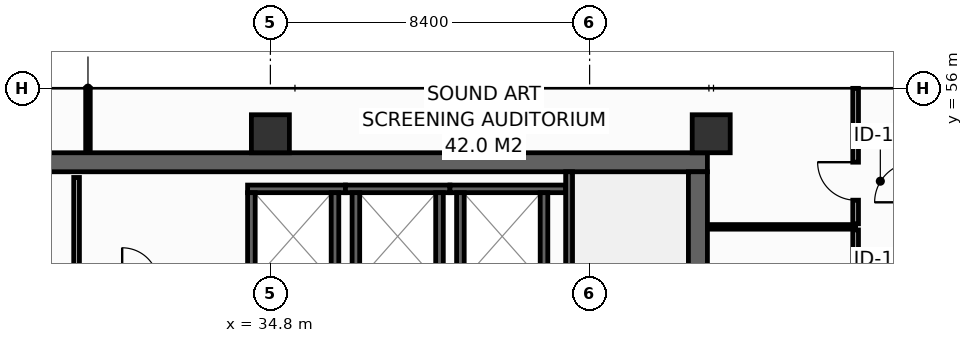
"""IFC4 building model, lengths in metres.
Left out: names, types, materials, properties, quantities, classifications, styles, units other than length and angle.
Written with IfcOpenShell. Run it as: python <this file> out.ifc"""

import sys

from ifc_helpers import new_model, si_unit, direction, frame, frame_2d, origin, origin_2d, place, context, subcontext, project, spatial, rectangle, hollow_rectangle, extrude, element, fill, save


model = new_model("IFC4")
c1 = context("Model", 3, precision=1e-05, world=origin(), true_north=direction((0.0, 1.0)))
c2 = subcontext(c1, "Body", "Model", "MODEL_VIEW")
j1 = project(units=[si_unit("LENGTHUNIT", "METRE"), si_unit("PLANEANGLEUNIT", "RADIAN")], contexts=[c1])
p1 = place(None, origin())
s1 = spatial("IfcSite", under=j1, at=p1, CompositionType="ELEMENT")
p2 = place(p1, origin())
s2 = spatial("IfcBuilding", under=s1, at=p2, CompositionType="ELEMENT")
p3 = place(p2, frame((0.0, 0.0, 148.6)))
s3 = spatial("IfcBuildingStorey", under=s2, at=p3, CompositionType="ELEMENT", Elevation=148.6)
p4 = place(p3, frame((13.6, 54.05, 0.0), z_axis=(0.0, 0.0, 1.0), x_axis=(1.0, 0.0, 0.0)))
e1 = element("IfcWall", 1, at=p4, inside=s3, PredefinedType="SHEAR", context=c2, shape_type="SweptSolid", body=[
    extrude(rectangle(XDim=32.7, YDim=0.5, at=frame_2d((16.35, 0.0))), origin(), (0.0, 0.0, 1.0), 3.55),
])
p5 = place(p3, frame((46.05, 43.4, 0.0), z_axis=(0.0, 0.0, 1.0), x_axis=(0.0, 1.0, 0.0)))
e2 = element("IfcWall", 2, at=p5, inside=s3, PredefinedType="SHEAR", context=c2, shape_type="SweptSolid", body=[
    extrude(rectangle(XDim=10.4, YDim=0.5, at=frame_2d((5.2, 0.0))), origin(), (0.0, 0.0, 1.0), 3.55),
])
for number, where, z_axis, x_axis in (
    (3, (34.8, 54.8, 0.0), (0.0, 0.0, 1.0), (1.0, 0.0, 0.0)),
    (4, (46.4, 54.8, 0.0), (0.0, 0.0, 1.0), (1.0, 0.0, 0.0)),
):
    element("IfcColumn", number, at=place(p3, frame(where, z_axis=z_axis, x_axis=x_axis)), inside=s3, PredefinedType="COLUMN", context=c2, shape_type="SweptSolid", body=[
        extrude(hollow_rectangle(XDim=1.0, YDim=1.0, WallThickness=0.045, at=origin_2d()), origin(), (0.0, 0.0, 1.0), 3.8),
    ])
p6 = place(p3, frame((34.2, 53.35, 0.0), z_axis=(0.0, 0.0, 1.0), x_axis=(1.0, 0.0, 0.0)))
e5 = element("IfcWall", 5, at=p6, inside=s3, PredefinedType="SHEAR", context=c2, shape_type="SweptSolid", body=[
    extrude(rectangle(XDim=2.575, YDim=0.2, at=frame_2d((1.288, 0.0))), origin(), (0.0, 0.0, 1.0), 3.55),
])
for number, where, z_axis, x_axis in (
    (6, (34.3, 50.95, 0.0), (0.0, 0.0, 1.0), (0.0, 1.0, 0.0)),
    (7, (36.5, 50.95, 0.0), (0.0, 0.0, 1.0), (0.0, 1.0, 0.0)),
):
    element("IfcWall", number, at=place(p3, frame(where, z_axis=z_axis, x_axis=x_axis)), inside=s3, PredefinedType="SHEAR", context=c2, shape_type="SweptSolid", body=[
        extrude(rectangle(XDim=2.3, YDim=0.2, at=frame_2d((1.15, 0.0))), origin(), (0.0, 0.0, 1.0), 3.55),
    ])
p7 = place(p3, frame((36.775, 53.35, 0.0), z_axis=(0.0, 0.0, 1.0), x_axis=(1.0, 0.0, 0.0)))
e8 = element("IfcWall", 8, at=p7, inside=s3, PredefinedType="SHEAR", context=c2, shape_type="SweptSolid", body=[
    extrude(rectangle(XDim=2.75, YDim=0.2, at=frame_2d((1.375, 0.0))), origin(), (0.0, 0.0, 1.0), 3.55),
])
for number, where, z_axis, x_axis in (
    (9, (37.05, 50.95, 0.0), (0.0, 0.0, 1.0), (0.0, 1.0, 0.0)),
    (10, (39.25, 50.95, 0.0), (0.0, 0.0, 1.0), (0.0, 1.0, 0.0)),
):
    element("IfcWall", number, at=place(p3, frame(where, z_axis=z_axis, x_axis=x_axis)), inside=s3, PredefinedType="SHEAR", context=c2, shape_type="SweptSolid", body=[
        extrude(rectangle(XDim=2.3, YDim=0.2, at=frame_2d((1.15, 0.0))), origin(), (0.0, 0.0, 1.0), 3.55),
    ])
p8 = place(p3, frame((39.525, 53.35, 0.0), z_axis=(0.0, 0.0, 1.0), x_axis=(1.0, 0.0, 0.0)))
e11 = element("IfcWall", 11, at=p8, inside=s3, PredefinedType="SHEAR", context=c2, shape_type="SweptSolid", body=[
    extrude(rectangle(XDim=3.045, YDim=0.2, at=frame_2d((1.522, 0.0))), origin(), (0.0, 0.0, 1.0), 3.55),
])
for number, where, z_axis, x_axis in (
    (12, (39.8, 50.95, 0.0), (0.0, 0.0, 1.0), (0.0, 1.0, 0.0)),
    (13, (42.0, 50.95, 0.0), (0.0, 0.0, 1.0), (0.0, 1.0, 0.0)),
):
    element("IfcWall", number, at=place(p3, frame(where, z_axis=z_axis, x_axis=x_axis)), inside=s3, PredefinedType="SHEAR", context=c2, shape_type="SweptSolid", body=[
        extrude(rectangle(XDim=2.3, YDim=0.2, at=frame_2d((1.15, 0.0))), origin(), (0.0, 0.0, 1.0), 3.55),
    ])
p9 = place(p3, frame((42.66, 53.8, 0.0), z_axis=(0.0, 0.0, 1.0), x_axis=(0.0, -1.0, 0.0)))
e14 = element("IfcWall", 14, at=p9, inside=s3, PredefinedType="SHEAR", context=c2, shape_type="SweptSolid", body=[
    extrude(rectangle(XDim=10.4, YDim=0.18, at=frame_2d((5.2, 0.0))), origin(), (0.0, 0.0, 1.0), 3.55),
])
p10 = place(p9, frame((8.99, 0.0, 0.0)))
e15 = element("IfcOpeningElement", 15, at=p10, cuts=e14, PredefinedType="OPENING", context=c2, shape_type="SweptSolid", body=[
    extrude(rectangle(XDim=1.1, YDim=2.15, at=frame_2d((0.55, 1.075))), frame((0.0, 0.1, 0.0), z_axis=(0.0, -1.0, 0.0), x_axis=(1.0, 0.0, 0.0)), (0.0, 0.0, 1.0), 0.2),
])
p11 = place(p3, frame((29.7, 50.95, 0.0), z_axis=(0.0, 0.0, 1.0), x_axis=(0.0, 1.0, 0.0)))
e16 = element("IfcWall", 16, at=p11, inside=s3, PredefinedType="PARTITIONING", context=c2, shape_type="SweptSolid", body=[
    extrude(rectangle(XDim=2.7, YDim=0.15, at=frame_2d((1.35, 0.0))), origin(), (0.0, 0.0, 1.0), 3.55),
])
p12 = place(p3, frame((46.32, 52.35, 0.0), z_axis=(0.0, 0.0, 1.0), x_axis=(1.0, 0.0, 0.0)))
e17 = element("IfcWall", 17, at=p12, inside=s3, PredefinedType="PARTITIONING", context=c2, shape_type="SweptSolid", body=[
    extrude(rectangle(XDim=3.88, YDim=0.12, at=frame_2d((1.94, 0.0))), origin(), (0.0, 0.0, 1.0), 3.55),
])
p13 = place(p3, frame((30.0, 54.32, 0.0), z_axis=(0.0, 0.0, 1.0), x_axis=(0.0, 1.0, 0.0)))
e18 = element("IfcWall", 18, at=p13, inside=s3, PredefinedType="PARTITIONING", context=c2, shape_type="SweptSolid", body=[
    extrude(rectangle(XDim=1.675, YDim=0.12, at=frame_2d((0.837, 0.0))), origin(), (0.0, 0.0, 1.0), 2.935),
])
p14 = place(p3, frame((50.2, 48.29, 0.0), z_axis=(0.0, 0.0, 1.0), x_axis=(0.0, 1.0, 0.0)))
e19 = element("IfcWall", 19, at=p14, inside=s3, PredefinedType="PARTITIONING", context=c2, shape_type="SweptSolid", body=[
    extrude(rectangle(XDim=3.98, YDim=0.15, at=frame_2d((1.99, 0.0))), origin(), (0.0, 0.0, 1.0), 3.55),
])
p15 = place(p14, frame((1.49, 0.0, 0.0)))
e20 = element("IfcOpeningElement", 20, at=p15, cuts=e19, PredefinedType="OPENING", context=c2, shape_type="SweptSolid", body=[
    extrude(rectangle(XDim=1.0, YDim=2.15, at=frame_2d((0.5, 1.075))), frame((0.0, 0.085, 0.0), z_axis=(0.0, -1.0, 0.0), x_axis=(1.0, 0.0, 0.0)), (0.0, 0.0, 1.0), 0.17),
])
p16 = place(p3, frame((50.2, 52.43, 0.0), z_axis=(0.0, 0.0, 1.0), x_axis=(0.0, 1.0, 0.0)))
e21 = element("IfcWall", 21, at=p16, inside=s3, PredefinedType="PARTITIONING", context=c2, shape_type="SweptSolid", body=[
    extrude(rectangle(XDim=3.565, YDim=0.15, at=frame_2d((1.783, 0.0))), origin(), (0.0, 0.0, 1.0), 2.935),
])
p17 = place(p16, frame((0.622, 0.0, 0.0)))
e22 = element("IfcOpeningElement", 22, at=p17, cuts=e21, PredefinedType="OPENING", context=c2, shape_type="SweptSolid", body=[
    extrude(rectangle(XDim=1.0, YDim=2.15, at=frame_2d((0.5, 1.075))), frame((0.0, 0.085, 0.0), z_axis=(0.0, -1.0, 0.0), x_axis=(1.0, 0.0, 0.0)), (0.0, 0.0, 1.0), 0.17),
])
p18 = place(p17, origin())
e23 = element("IfcDoor", 23, at=p18, inside=s3, OperationType="SINGLE_SWING_RIGHT", PredefinedType="DOOR", context=c2, shape_type="SweptSolid", body=[
    extrude(rectangle(XDim=1.0, YDim=2.15, at=frame_2d((0.5, 1.075))), frame((0.0, 0.025, 0.0), z_axis=(0.0, -1.0, 0.0), x_axis=(1.0, 0.0, 0.0)), (0.0, 0.0, 1.0), 0.05),
])
fill(e22, e23)
save(model, sys.argv[1])
